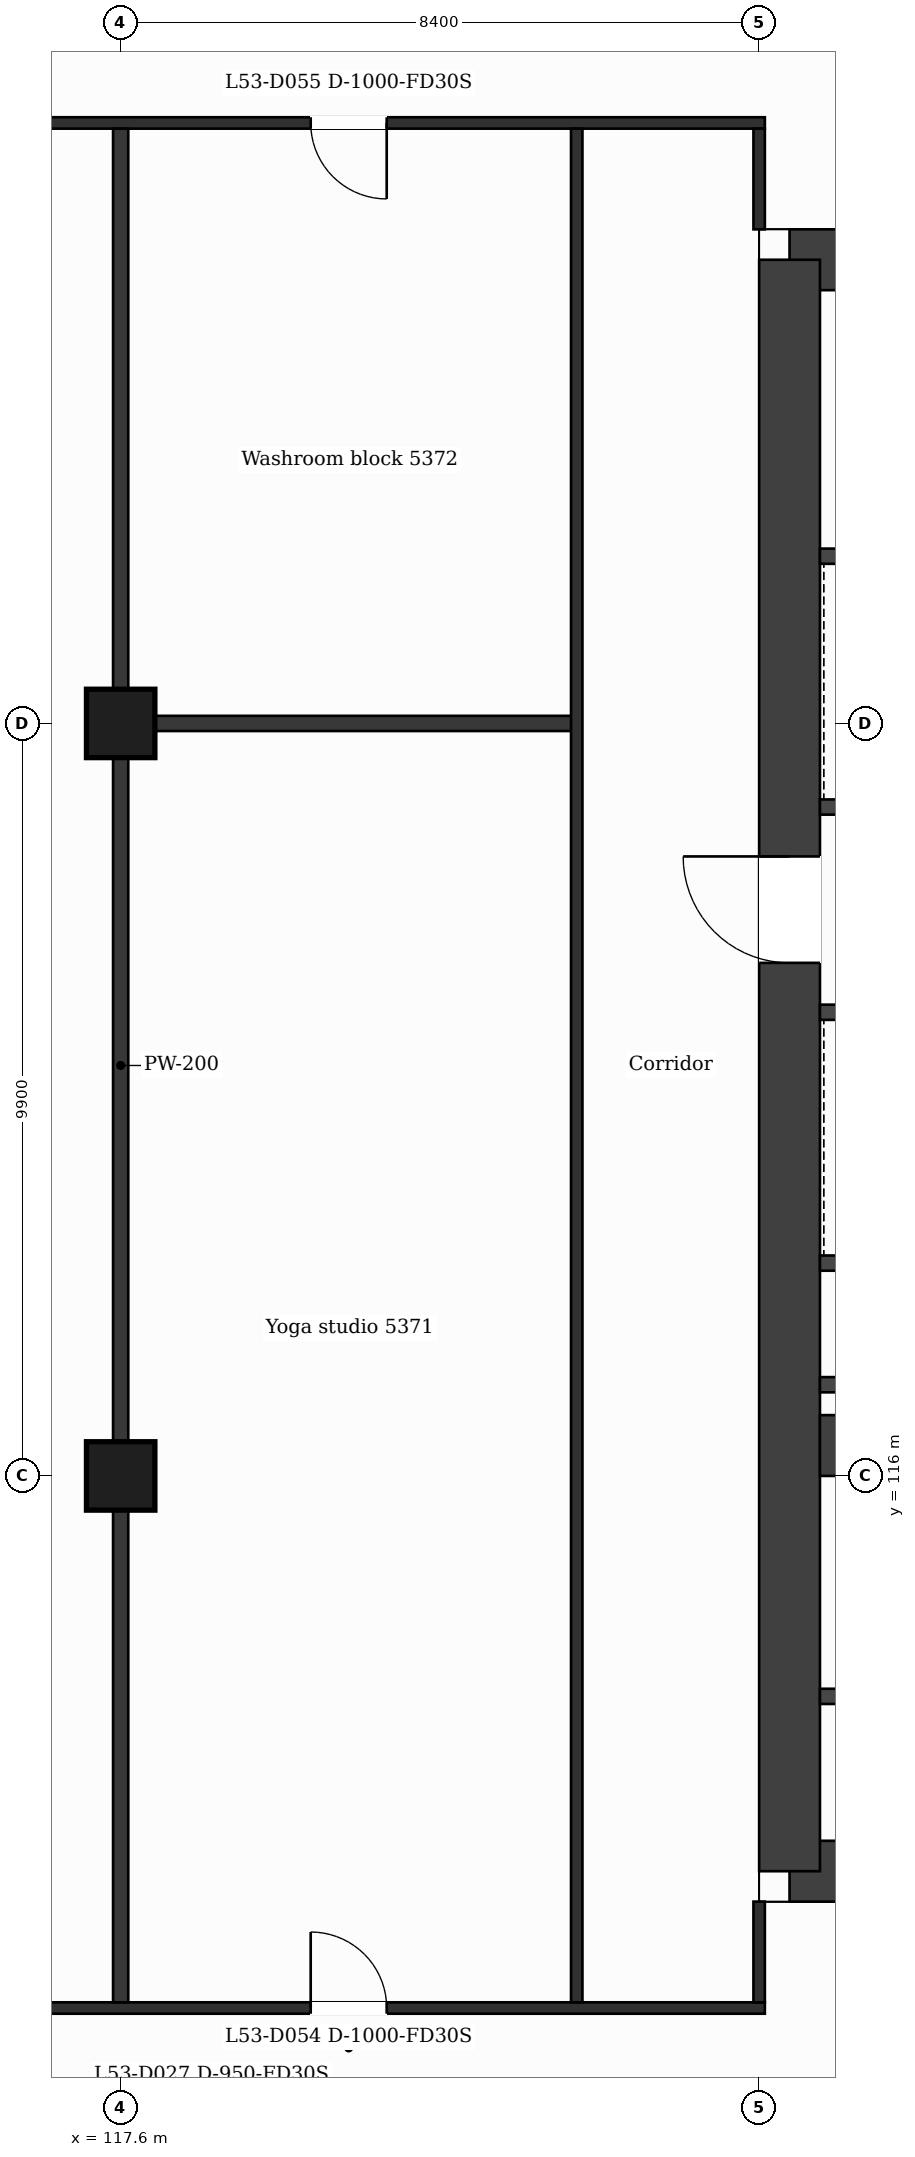
"""IFC4 building model, lengths in metres.
Left out: names, types, materials, properties, quantities, classifications, styles, units other than length and angle.
Written with IfcOpenShell. Run it as: python <this file> out.ifc"""

import sys

from ifc_helpers import new_model, si_unit, direction, frame, frame_2d, origin, origin_2d, place, context, subcontext, project, spatial, rectangle, extrude, element, fill, save


model = new_model("IFC4")
c1 = context("Model", 3, precision=1e-05, world=origin(), true_north=direction((0.0, 1.0)))
c2 = subcontext(c1, "Body", "Model", "MODEL_VIEW")
j1 = project(units=[si_unit("LENGTHUNIT", "METRE"), si_unit("PLANEANGLEUNIT", "RADIAN")], contexts=[c1])
p1 = place(None, origin())
s1 = spatial("IfcSite", under=j1, at=p1, CompositionType="ELEMENT")
p2 = place(p1, origin())
s2 = spatial("IfcBuilding", under=s1, at=p2, CompositionType="ELEMENT")
p3 = place(p2, frame((0.0, 0.0, 220.7)))
s3 = spatial("IfcBuildingStorey", under=s2, at=p3, CompositionType="ELEMENT", Elevation=220.7)
p4 = place(p3, frame((126.4, 132.0, 0.0), z_axis=(0.0, 0.0, 1.0), x_axis=(1.0, 0.0, 0.0)))
e1 = element("IfcWall", 1, at=p4, inside=s3, PredefinedType="SHEAR", context=c2, shape_type="SweptSolid", body=[
    extrude(rectangle(XDim=11.42, YDim=0.8, at=frame_2d((5.71, 0.0))), origin(), (0.0, 0.0, 1.0), 3.7),
])
p5 = place(p4, frame((3.386, 0.0, 0.0)))
e2 = element("IfcOpeningElement", 2, at=p5, cuts=e1, PredefinedType="OPENING", context=c2, shape_type="SweptSolid", body=[
    extrude(rectangle(XDim=1.2, YDim=2.1, at=frame_2d((0.6, 1.05))), frame((0.0, 0.41, 0.0), z_axis=(0.0, -1.0, 0.0), x_axis=(1.0, 0.0, 0.0)), (0.0, 0.0, 1.0), 0.82),
])
p6 = place(p3, frame((140.673, 110.8, 0.0), z_axis=(0.0, 0.0, 1.0), x_axis=(-1.0, 0.0, 0.0)))
e3 = element("IfcWall", 3, at=p6, inside=s3, PredefinedType="SHEAR", context=c2, shape_type="SweptSolid", body=[
    extrude(rectangle(XDim=14.273, YDim=0.8, at=frame_2d((7.137, 0.0))), origin(), (0.0, 0.0, 1.0), 3.7),
])
p7 = place(p6, frame((6.965, 0.0, 0.0)))
e4 = element("IfcOpeningElement", 4, at=p7, cuts=e3, PredefinedType="OPENING", context=c2, shape_type="SweptSolid", body=[
    extrude(rectangle(XDim=1.4, YDim=2.1, at=frame_2d((0.7, 1.05))), frame((0.0, 0.41, 0.0), z_axis=(0.0, -1.0, 0.0), x_axis=(1.0, 0.0, 0.0)), (0.0, 0.0, 1.0), 0.82),
])
p8 = place(p3, frame((126.4, 110.8, 0.0), z_axis=(0.0, 0.0, 1.0), x_axis=(0.0, 1.0, 0.0)))
e5 = element("IfcWall", 5, at=p8, inside=s3, PredefinedType="SHEAR", context=c2, shape_type="SweptSolid", body=[
    extrude(rectangle(XDim=21.2, YDim=0.8, at=frame_2d((10.6, 0.0))), origin(), (0.0, 0.0, 1.0), 3.7),
])
p9 = place(p8, frame((11.95, 0.0, 0.0)))
e6 = element("IfcOpeningElement", 6, at=p9, cuts=e5, PredefinedType="OPENING", context=c2, shape_type="SweptSolid", body=[
    extrude(rectangle(XDim=1.4, YDim=2.1, at=frame_2d((0.7, 1.05))), frame((0.0, 0.41, 0.0), z_axis=(0.0, -1.0, 0.0), x_axis=(1.0, 0.0, 0.0)), (0.0, 0.0, 1.0), 0.82),
])
p10 = place(p3, frame((126.8, 116.4, 0.0), z_axis=(0.0, 0.0, 1.0), x_axis=(1.0, 0.0, 0.0)))
e7 = element("IfcWall", 7, at=p10, inside=s3, PredefinedType="SHEAR", context=c2, shape_type="SweptSolid", body=[
    extrude(rectangle(XDim=5.3, YDim=0.8, at=frame_2d((2.65, 0.0))), origin(), (0.0, 0.0, 1.0), 3.7),
])
for number, where, z_axis, x_axis in (
    (8, (117.6, 116.0, 0.0), (0.0, 0.0, 1.0), (1.0, 0.0, 0.0)),
    (9, (117.6, 125.9, 0.0), (0.0, 0.0, 1.0), (1.0, 0.0, 0.0)),
):
    element("IfcColumn", number, at=place(p3, frame(where, z_axis=z_axis, x_axis=x_axis)), inside=s3, PredefinedType="COLUMN", context=c2, shape_type="SweptSolid", body=[
        extrude(rectangle(XDim=0.9, YDim=0.9, at=origin_2d()), origin(), (0.0, 0.0, 1.0), 3.7),
    ])
p11 = place(p3, frame((100.725, 109.0, 0.0), z_axis=(0.0, 0.0, 1.0), x_axis=(1.0, 0.0, 0.0)))
e10 = element("IfcWall", 10, at=p11, inside=s3, PredefinedType="PARTITIONING", context=c2, shape_type="SweptSolid", body=[
    extrude(rectangle(XDim=25.35, YDim=0.15, at=frame_2d((12.675, 0.0))), origin(), (0.0, 0.0, 1.0), 3.38),
])
p12 = place(p11, frame((6.8, 0.0, 0.0)))
e11 = element("IfcOpeningElement", 11, at=p12, cuts=e10, PredefinedType="OPENING", context=c2, shape_type="SweptSolid", body=[
    extrude(rectangle(XDim=1.0, YDim=2.1, at=frame_2d((0.5, 1.05))), frame((0.0, 0.085, 0.0), z_axis=(0.0, -1.0, 0.0), x_axis=(1.0, 0.0, 0.0)), (0.0, 0.0, 1.0), 0.17),
])
p13 = place(p11, frame((3.475, 0.0, 0.0)))
e12 = element("IfcOpeningElement", 12, at=p13, cuts=e10, PredefinedType="OPENING", context=c2, shape_type="SweptSolid", body=[
    extrude(rectangle(XDim=1.0, YDim=2.1, at=frame_2d((0.5, 1.05))), frame((0.0, 0.085, 0.0), z_axis=(0.0, -1.0, 0.0), x_axis=(1.0, 0.0, 0.0)), (0.0, 0.0, 1.0), 0.17),
])
p14 = place(p11, frame((10.5, 0.0, 0.0)))
e13 = element("IfcOpeningElement", 13, at=p14, cuts=e10, PredefinedType="OPENING", context=c2, shape_type="SweptSolid", body=[
    extrude(rectangle(XDim=1.0, YDim=2.1, at=frame_2d((0.5, 1.05))), frame((0.0, 0.085, 0.0), z_axis=(0.0, -1.0, 0.0), x_axis=(1.0, 0.0, 0.0)), (0.0, 0.0, 1.0), 0.17),
])
p15 = place(p11, frame((19.375, 0.0, 0.0)))
e14 = element("IfcOpeningElement", 14, at=p15, cuts=e10, PredefinedType="OPENING", context=c2, shape_type="SweptSolid", body=[
    extrude(rectangle(XDim=1.0, YDim=2.1, at=frame_2d((0.5, 1.05))), frame((0.0, 0.085, 0.0), z_axis=(0.0, -1.0, 0.0), x_axis=(1.0, 0.0, 0.0)), (0.0, 0.0, 1.0), 0.17),
])
p16 = place(p3, frame((126.8, 113.1, 0.0), z_axis=(0.0, 0.0, 1.0), x_axis=(1.0, 0.0, 0.0)))
e15 = element("IfcWall", 15, at=p16, inside=s3, PredefinedType="PARTITIONING", context=c2, shape_type="SweptSolid", body=[
    extrude(rectangle(XDim=4.873, YDim=0.2, at=frame_2d((2.437, 0.0))), origin(), (0.0, 0.0, 1.0), 3.38),
])
p17 = place(p16, frame((0.94, 0.0, 0.0)))
e16 = element("IfcOpeningElement", 16, at=p17, cuts=e15, PredefinedType="OPENING", context=c2, shape_type="SweptSolid", body=[
    extrude(rectangle(XDim=0.9, YDim=2.1, at=frame_2d((0.45, 1.05))), frame((0.0, 0.11, 0.0), z_axis=(0.0, -1.0, 0.0), x_axis=(1.0, 0.0, 0.0)), (0.0, 0.0, 1.0), 0.22),
])
for number, where, z_axis, x_axis in (
    (17, (126.8, 117.2, 0.0), (0.0, 0.0, 1.0), (1.0, 0.0, 0.0)),
    (18, (126.8, 118.8, 0.0), (0.0, 0.0, 1.0), (1.0, 0.0, 0.0)),
):
    element("IfcWall", number, at=place(p3, frame(where, z_axis=z_axis, x_axis=x_axis)), inside=s3, PredefinedType="PARTITIONING", context=c2, shape_type="SweptSolid", body=[
        extrude(rectangle(XDim=4.773, YDim=0.2, at=frame_2d((2.386, 0.0))), origin(), (0.0, 0.0, 1.0), 3.38),
    ])
p18 = place(p3, frame((126.8, 122.1, 0.0), z_axis=(0.0, 0.0, 1.0), x_axis=(1.0, 0.0, 0.0)))
e19 = element("IfcWall", 19, at=p18, inside=s3, PredefinedType="PARTITIONING", context=c2, shape_type="SweptSolid", body=[
    extrude(rectangle(XDim=4.773, YDim=0.2, at=frame_2d((2.386, 0.0))), origin(), (0.0, 0.0, 1.0), 3.38),
])
p19 = place(p18, frame((2.883, 0.0, 0.0)))
e20 = element("IfcOpeningElement", 20, at=p19, cuts=e19, PredefinedType="OPENING", context=c2, shape_type="SweptSolid", body=[
    extrude(rectangle(XDim=1.1, YDim=2.1, at=frame_2d((0.55, 1.05))), frame((0.0, 0.11, 0.0), z_axis=(0.0, -1.0, 0.0), x_axis=(1.0, 0.0, 0.0)), (0.0, 0.0, 1.0), 0.22),
])
p20 = place(p18, frame((0.643, 0.0, 0.0)))
e21 = element("IfcOpeningElement", 21, at=p20, cuts=e19, PredefinedType="OPENING", context=c2, shape_type="SweptSolid", body=[
    extrude(rectangle(XDim=1.1, YDim=2.1, at=frame_2d((0.55, 1.05))), frame((0.0, 0.11, 0.0), z_axis=(0.0, -1.0, 0.0), x_axis=(1.0, 0.0, 0.0)), (0.0, 0.0, 1.0), 0.22),
])
p21 = place(p3, frame((126.8, 124.8, 0.0), z_axis=(0.0, 0.0, 1.0), x_axis=(1.0, 0.0, 0.0)))
e22 = element("IfcWall", 22, at=p21, inside=s3, PredefinedType="PARTITIONING", context=c2, shape_type="SweptSolid", body=[
    extrude(rectangle(XDim=4.782, YDim=0.2, at=frame_2d((2.391, 0.0))), origin(), (0.0, 0.0, 1.0), 3.38),
])
p22 = place(p21, frame((0.705, 0.0, 0.0)))
e23 = element("IfcOpeningElement", 23, at=p22, cuts=e22, PredefinedType="OPENING", context=c2, shape_type="SweptSolid", body=[
    extrude(rectangle(XDim=1.1, YDim=2.1, at=frame_2d((0.55, 1.05))), frame((0.0, 0.11, 0.0), z_axis=(0.0, -1.0, 0.0), x_axis=(1.0, 0.0, 0.0)), (0.0, 0.0, 1.0), 0.22),
])
p23 = place(p3, frame((117.6, 125.9, 0.0), z_axis=(0.0, 0.0, 1.0), x_axis=(1.0, 0.0, 0.0)))
e24 = element("IfcWall", 24, at=p23, inside=s3, PredefinedType="PARTITIONING", context=c2, shape_type="SweptSolid", body=[
    extrude(rectangle(XDim=6.0, YDim=0.2, at=frame_2d((3.0, 0.0))), origin(), (0.0, 0.0, 1.0), 3.38),
])
p24 = place(p3, frame((126.8, 128.1, 0.0), z_axis=(0.0, 0.0, 1.0), x_axis=(1.0, 0.0, 0.0)))
e25 = element("IfcWall", 25, at=p24, inside=s3, PredefinedType="PARTITIONING", context=c2, shape_type="SweptSolid", body=[
    extrude(rectangle(XDim=4.782, YDim=0.2, at=frame_2d((2.391, 0.0))), origin(), (0.0, 0.0, 1.0), 3.38),
])
p25 = place(p24, frame((2.977, 0.0, 0.0)))
e26 = element("IfcOpeningElement", 26, at=p25, cuts=e25, PredefinedType="OPENING", context=c2, shape_type="SweptSolid", body=[
    extrude(rectangle(XDim=1.1, YDim=2.1, at=frame_2d((0.55, 1.05))), frame((0.0, 0.11, 0.0), z_axis=(0.0, -1.0, 0.0), x_axis=(1.0, 0.0, 0.0)), (0.0, 0.0, 1.0), 0.22),
])
p26 = place(p3, frame((100.725, 133.8, 0.0), z_axis=(0.0, 0.0, 1.0), x_axis=(1.0, 0.0, 0.0)))
e27 = element("IfcWall", 27, at=p26, inside=s3, PredefinedType="PARTITIONING", context=c2, shape_type="SweptSolid", body=[
    extrude(rectangle(XDim=25.35, YDim=0.15, at=frame_2d((12.675, 0.0))), origin(), (0.0, 0.0, 1.0), 3.38),
])
p27 = place(p26, frame((6.05, 0.0, 0.0)))
e28 = element("IfcOpeningElement", 28, at=p27, cuts=e27, PredefinedType="OPENING", context=c2, shape_type="SweptSolid", body=[
    extrude(rectangle(XDim=1.0, YDim=2.1, at=frame_2d((0.5, 1.05))), frame((0.0, 0.085, 0.0), z_axis=(0.0, -1.0, 0.0), x_axis=(1.0, 0.0, 0.0)), (0.0, 0.0, 1.0), 0.17),
])
p28 = place(p26, frame((19.375, 0.0, 0.0)))
e29 = element("IfcOpeningElement", 29, at=p28, cuts=e27, PredefinedType="OPENING", context=c2, shape_type="SweptSolid", body=[
    extrude(rectangle(XDim=1.0, YDim=2.1, at=frame_2d((0.5, 1.05))), frame((0.0, 0.085, 0.0), z_axis=(0.0, -1.0, 0.0), x_axis=(1.0, 0.0, 0.0)), (0.0, 0.0, 1.0), 0.17),
])
p29 = place(p3, frame((117.6, 109.075, 0.0), z_axis=(0.0, 0.0, 1.0), x_axis=(0.0, 1.0, 0.0)))
e30 = element("IfcWall", 30, at=p29, inside=s3, PredefinedType="PARTITIONING", context=c2, shape_type="SweptSolid", body=[
    extrude(rectangle(XDim=24.65, YDim=0.2, at=frame_2d((12.325, 0.0))), origin(), (0.0, 0.0, 1.0), 3.38),
])
p30 = place(p3, frame((123.6, 109.075, 0.0), z_axis=(0.0, 0.0, 1.0), x_axis=(0.0, 1.0, 0.0)))
e31 = element("IfcWall", 31, at=p30, inside=s3, PredefinedType="PARTITIONING", context=c2, shape_type="SweptSolid", body=[
    extrude(rectangle(XDim=24.65, YDim=0.15, at=frame_2d((12.325, 0.0))), origin(), (0.0, 0.0, 1.0), 3.38),
])
p31 = place(p3, frame((126.0, 109.075, 0.0), z_axis=(0.0, 0.0, 1.0), x_axis=(0.0, 1.0, 0.0)))
e32 = element("IfcWall", 32, at=p31, inside=s3, PredefinedType="PARTITIONING", context=c2, shape_type="SweptSolid", body=[
    extrude(rectangle(XDim=1.325, YDim=0.15, at=frame_2d((0.663, 0.0))), origin(), (0.0, 0.0, 1.0), 3.38),
])
p32 = place(p3, frame((126.0, 132.4, 0.0), z_axis=(0.0, 0.0, 1.0), x_axis=(0.0, 1.0, 0.0)))
e33 = element("IfcWall", 33, at=p32, inside=s3, PredefinedType="PARTITIONING", context=c2, shape_type="SweptSolid", body=[
    extrude(rectangle(XDim=1.325, YDim=0.15, at=frame_2d((0.663, 0.0))), origin(), (0.0, 0.0, 1.0), 3.38),
])
p33 = place(p15, origin())
e34 = element("IfcDoor", 34, at=p33, inside=s3, OperationType="SINGLE_SWING_LEFT", PredefinedType="DOOR", context=c2, shape_type="SweptSolid", body=[
    extrude(rectangle(XDim=1.0, YDim=2.1, at=frame_2d((0.5, 1.05))), frame((0.0, 0.025, 0.0), z_axis=(0.0, -1.0, 0.0), x_axis=(1.0, 0.0, 0.0)), (0.0, 0.0, 1.0), 0.05),
])
fill(e14, e34)
p34 = place(p28, origin())
e35 = element("IfcDoor", 35, at=p34, inside=s3, OperationType="SINGLE_SWING_RIGHT", PredefinedType="DOOR", context=c2, shape_type="SweptSolid", body=[
    extrude(rectangle(XDim=1.0, YDim=2.1, at=frame_2d((0.5, 1.05))), frame((0.0, 0.025, 0.0), z_axis=(0.0, -1.0, 0.0), x_axis=(1.0, 0.0, 0.0)), (0.0, 0.0, 1.0), 0.05),
])
fill(e29, e35)
p35 = place(p9, origin())
e36 = element("IfcDoor", 36, at=p35, inside=s3, OperationType="SINGLE_SWING_RIGHT", PredefinedType="DOOR", context=c2, shape_type="SweptSolid", body=[
    extrude(rectangle(XDim=1.4, YDim=2.1, at=frame_2d((0.7, 1.05))), frame((0.0, 0.025, 0.0), z_axis=(0.0, -1.0, 0.0), x_axis=(1.0, 0.0, 0.0)), (0.0, 0.0, 1.0), 0.05),
])
fill(e6, e36)
save(model, sys.argv[1])
